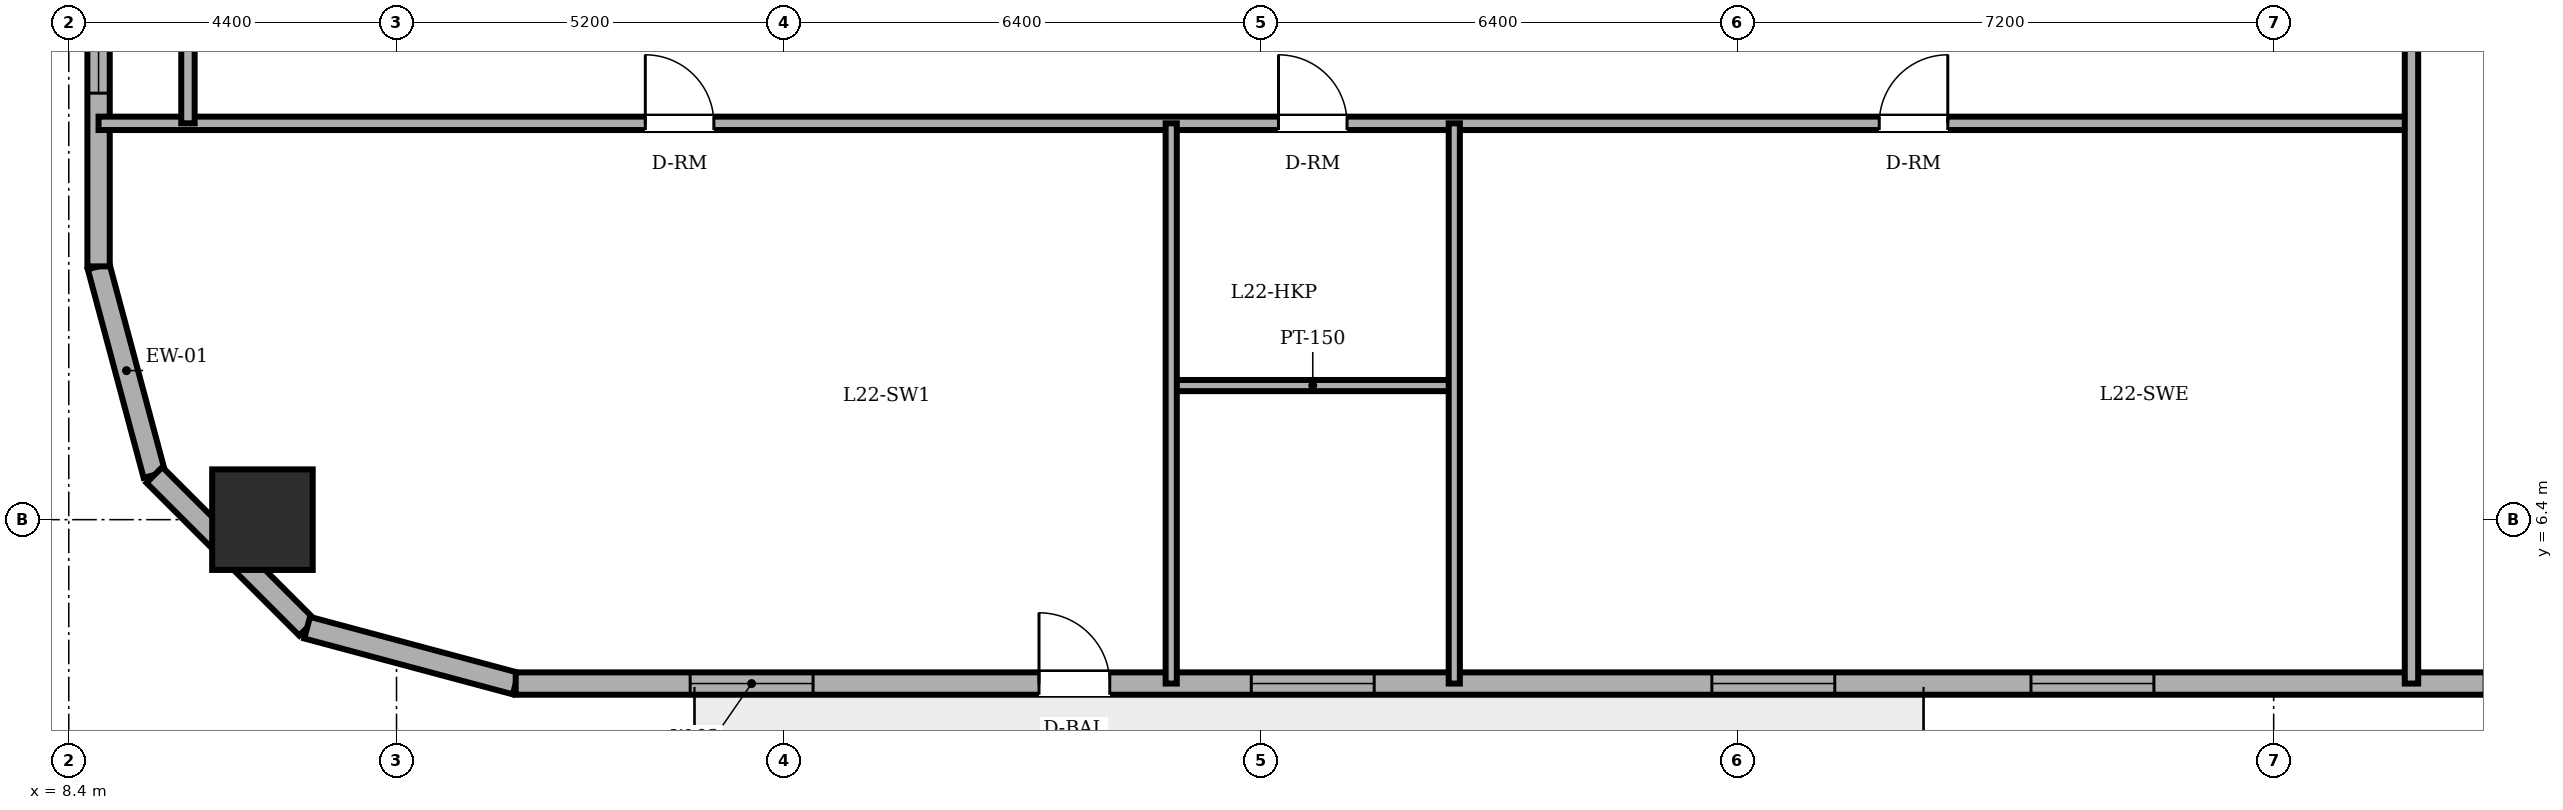
"""IFC4 building model, lengths in metres.
Left out: names, types, materials, properties, quantities, classifications, styles, units other than length and angle.
Written with IfcOpenShell. Run it as: python <this file> out.ifc"""

import sys

from ifc_helpers import new_model, si_unit, direction, frame, frame_2d, origin, origin_2d, place, context, subcontext, project, spatial, rectangle, circle, extrude, element, fill, save


model = new_model("IFC4")
c1 = context("Model", 3, precision=1e-05, world=origin(), true_north=direction((0.0, 1.0)))
c2 = subcontext(c1, "Body", "Model", "MODEL_VIEW")
j1 = project(units=[si_unit("LENGTHUNIT", "METRE"), si_unit("PLANEANGLEUNIT", "RADIAN")], contexts=[c1])
p1 = place(None, origin())
s1 = spatial("IfcSite", under=j1, at=p1, CompositionType="ELEMENT")
p2 = place(p1, origin())
s2 = spatial("IfcBuilding", under=s1, at=p2, CompositionType="ELEMENT")
p3 = place(p2, frame((0.0, 0.0, 86.3)))
s3 = spatial("IfcBuildingStorey", under=s2, at=p3, CompositionType="ELEMENT", Elevation=86.3)
p4 = place(p3, frame((11.0, 6.4, 0.0), z_axis=(0.0, 0.0, 1.0), x_axis=(1.0, 0.0, 0.0)))
e1 = element("IfcColumn", 1, at=p4, inside=s3, PredefinedType="COLUMN", context=c2, shape_type="SweptSolid", body=[
    extrude(circle(Radius=0.675, at=origin_2d()), origin(), (0.0, 0.0, 1.0), 3.6),
])
p5 = place(p3, frame((8.8, 9.8, 0.0), z_axis=(0.0, 0.0, 1.0), x_axis=(0.258731875344, -0.96594917914, 0.0)))
e2 = element("IfcWall", 2, at=p5, inside=s3, PredefinedType="SOLIDWALL", context=c2, shape_type="SweptSolid", body=[
    extrude(rectangle(XDim=2.899, YDim=0.3, at=frame_2d((1.449, 0.0))), origin(), (0.0, 0.0, 1.0), 3.4),
])
p6 = place(p3, frame((9.55, 7.0, 0.0), z_axis=(0.0, 0.0, 1.0), x_axis=(0.707106781187, -0.707106781187, 0.0)))
e3 = element("IfcWall", 3, at=p6, inside=s3, PredefinedType="SOLIDWALL", context=c2, shape_type="SweptSolid", body=[
    extrude(rectangle(XDim=2.899, YDim=0.3, at=frame_2d((1.45, 0.0))), origin(), (0.0, 0.0, 1.0), 3.4),
])
p7 = place(p3, frame((11.6, 4.95, 0.0), z_axis=(0.0, 0.0, 1.0), x_axis=(0.965943540406, -0.258752926066, 0.0)))
e4 = element("IfcWall", 4, at=p7, inside=s3, PredefinedType="SOLIDWALL", context=c2, shape_type="SweptSolid", body=[
    extrude(rectangle(XDim=2.898, YDim=0.3, at=frame_2d((1.449, 0.0))), origin(), (0.0, 0.0, 1.0), 3.4),
])
p8 = place(p3, frame((14.4, 4.2, 0.0), z_axis=(0.0, 0.0, 1.0), x_axis=(1.0, 0.0, 0.0)))
e5 = element("IfcWall", 5, at=p8, inside=s3, PredefinedType="SOLIDWALL", context=c2, shape_type="SweptSolid", body=[
    extrude(rectangle(XDim=29.933, YDim=0.3, at=frame_2d((14.967, 0.0))), origin(), (0.0, 0.0, 1.0), 3.4),
])
p9 = place(p8, frame((7.025, 0.0, 0.0)))
e6 = element("IfcOpeningElement", 6, at=p9, cuts=e5, PredefinedType="OPENING", context=c2, shape_type="SweptSolid", body=[
    extrude(rectangle(XDim=0.95, YDim=2.2, at=frame_2d((0.475, 1.1))), frame((0.0, 0.16, 0.0), z_axis=(0.0, -1.0, 0.0), x_axis=(1.0, 0.0, 0.0)), (0.0, 0.0, 1.0), 0.32),
])
p10 = place(p8, frame((2.342, 0.0, 0.85)))
e7 = element("IfcOpeningElement", 7, at=p10, cuts=e5, PredefinedType="OPENING", context=c2, shape_type="SweptSolid", body=[
    extrude(rectangle(XDim=1.65, YDim=1.55, at=frame_2d((0.825, 0.775))), frame((0.0, 0.16, 0.0), z_axis=(0.0, -1.0, 0.0), x_axis=(1.0, 0.0, 0.0)), (0.0, 0.0, 1.0), 0.32),
])
p11 = place(p8, frame((9.875, 0.0, 0.85)))
e8 = element("IfcOpeningElement", 8, at=p11, cuts=e5, PredefinedType="OPENING", context=c2, shape_type="SweptSolid", body=[
    extrude(rectangle(XDim=1.65, YDim=1.55, at=frame_2d((0.825, 0.775))), frame((0.0, 0.16, 0.0), z_axis=(0.0, -1.0, 0.0), x_axis=(1.0, 0.0, 0.0)), (0.0, 0.0, 1.0), 0.32),
])
p12 = place(p8, frame((16.058, 0.0, 0.85)))
e9 = element("IfcOpeningElement", 9, at=p12, cuts=e5, PredefinedType="OPENING", context=c2, shape_type="SweptSolid", body=[
    extrude(rectangle(XDim=1.65, YDim=1.55, at=frame_2d((0.825, 0.775))), frame((0.0, 0.16, 0.0), z_axis=(0.0, -1.0, 0.0), x_axis=(1.0, 0.0, 0.0)), (0.0, 0.0, 1.0), 0.32),
])
p13 = place(p8, frame((20.342, 0.0, 0.85)))
e10 = element("IfcOpeningElement", 10, at=p13, cuts=e5, PredefinedType="OPENING", context=c2, shape_type="SweptSolid", body=[
    extrude(rectangle(XDim=1.65, YDim=1.55, at=frame_2d((0.825, 0.775))), frame((0.0, 0.16, 0.0), z_axis=(0.0, -1.0, 0.0), x_axis=(1.0, 0.0, 0.0)), (0.0, 0.0, 1.0), 0.32),
])
p14 = place(p8, frame((26.425, 0.0, 0.85)))
e11 = element("IfcOpeningElement", 11, at=p14, cuts=e5, PredefinedType="OPENING", context=c2, shape_type="SweptSolid", body=[
    extrude(rectangle(XDim=1.65, YDim=1.55, at=frame_2d((0.825, 0.775))), frame((0.0, 0.16, 0.0), z_axis=(0.0, -1.0, 0.0), x_axis=(1.0, 0.0, 0.0)), (0.0, 0.0, 1.0), 0.32),
])
p15 = place(p3, frame((8.8, 38.2, 0.0), z_axis=(0.0, 0.0, 1.0), x_axis=(0.0, -1.0, 0.0)))
e12 = element("IfcWall", 12, at=p15, inside=s3, PredefinedType="SOLIDWALL", context=c2, shape_type="SweptSolid", body=[
    extrude(rectangle(XDim=28.4, YDim=0.3, at=frame_2d((14.2, 0.0))), origin(), (0.0, 0.0, 1.0), 3.4),
])
p16 = place(p15, frame((2.325, 0.0, 0.85)))
e13 = element("IfcOpeningElement", 13, at=p16, cuts=e12, PredefinedType="OPENING", context=c2, shape_type="SweptSolid", body=[
    extrude(rectangle(XDim=1.65, YDim=1.55, at=frame_2d((0.825, 0.775))), frame((0.0, 0.16, 0.0), z_axis=(0.0, -1.0, 0.0), x_axis=(1.0, 0.0, 0.0)), (0.0, 0.0, 1.0), 0.32),
])
p17 = place(p15, frame((7.328, 0.0, 0.85)))
e14 = element("IfcOpeningElement", 14, at=p17, cuts=e12, PredefinedType="OPENING", context=c2, shape_type="SweptSolid", body=[
    extrude(rectangle(XDim=1.65, YDim=1.55, at=frame_2d((0.825, 0.775))), frame((0.0, 0.16, 0.0), z_axis=(0.0, -1.0, 0.0), x_axis=(1.0, 0.0, 0.0)), (0.0, 0.0, 1.0), 0.32),
])
p18 = place(p15, frame((11.102, 0.0, 0.85)))
e15 = element("IfcOpeningElement", 15, at=p18, cuts=e12, PredefinedType="OPENING", context=c2, shape_type="SweptSolid", body=[
    extrude(rectangle(XDim=1.65, YDim=1.55, at=frame_2d((0.825, 0.775))), frame((0.0, 0.16, 0.0), z_axis=(0.0, -1.0, 0.0), x_axis=(1.0, 0.0, 0.0)), (0.0, 0.0, 1.0), 0.32),
])
p19 = place(p15, frame((17.648, 0.0, 0.85)))
e16 = element("IfcOpeningElement", 16, at=p19, cuts=e12, PredefinedType="OPENING", context=c2, shape_type="SweptSolid", body=[
    extrude(rectangle(XDim=1.65, YDim=1.55, at=frame_2d((0.825, 0.775))), frame((0.0, 0.16, 0.0), z_axis=(0.0, -1.0, 0.0), x_axis=(1.0, 0.0, 0.0)), (0.0, 0.0, 1.0), 0.32),
])
p20 = place(p15, frame((20.422, 0.0, 0.85)))
e17 = element("IfcOpeningElement", 17, at=p20, cuts=e12, PredefinedType="OPENING", context=c2, shape_type="SweptSolid", body=[
    extrude(rectangle(XDim=1.65, YDim=1.55, at=frame_2d((0.825, 0.775))), frame((0.0, 0.16, 0.0), z_axis=(0.0, -1.0, 0.0), x_axis=(1.0, 0.0, 0.0)), (0.0, 0.0, 1.0), 0.32),
])
p21 = place(p15, frame((24.425, 0.0, 0.85)))
e18 = element("IfcOpeningElement", 18, at=p21, cuts=e12, PredefinedType="OPENING", context=c2, shape_type="SweptSolid", body=[
    extrude(rectangle(XDim=1.65, YDim=1.55, at=frame_2d((0.825, 0.775))), frame((0.0, 0.16, 0.0), z_axis=(0.0, -1.0, 0.0), x_axis=(1.0, 0.0, 0.0)), (0.0, 0.0, 1.0), 0.32),
])
p22 = place(p3, frame((23.2, 8.2, 0.0), z_axis=(0.0, 0.0, 1.0), x_axis=(1.0, 0.0, 0.0)))
e19 = element("IfcWall", 19, at=p22, inside=s3, PredefinedType="PARTITIONING", context=c2, shape_type="SweptSolid", body=[
    extrude(rectangle(XDim=3.8, YDim=0.15, at=frame_2d((1.9, 0.0))), origin(), (0.0, 0.0, 1.0), 3.4),
])
p23 = place(p3, frame((8.8, 11.72, 0.0), z_axis=(0.0, 0.0, 1.0), x_axis=(1.0, 0.0, 0.0)))
e20 = element("IfcWall", 20, at=p23, inside=s3, PredefinedType="PARTITIONING", context=c2, shape_type="SweptSolid", body=[
    extrude(rectangle(XDim=31.05, YDim=0.18, at=frame_2d((15.525, 0.0))), origin(), (0.0, 0.0, 1.0), 3.4),
])
p24 = place(p23, frame((15.84, 0.0, 0.0)))
e21 = element("IfcOpeningElement", 21, at=p24, cuts=e20, PredefinedType="OPENING", context=c2, shape_type="SweptSolid", body=[
    extrude(rectangle(XDim=0.92, YDim=2.1, at=frame_2d((0.46, 1.05))), frame((0.0, 0.1, 0.0), z_axis=(0.0, -1.0, 0.0), x_axis=(1.0, 0.0, 0.0)), (0.0, 0.0, 1.0), 0.2),
])
p25 = place(p23, frame((7.34, 0.0, 0.0)))
e22 = element("IfcOpeningElement", 22, at=p25, cuts=e20, PredefinedType="OPENING", context=c2, shape_type="SweptSolid", body=[
    extrude(rectangle(XDim=0.92, YDim=2.1, at=frame_2d((0.46, 1.05))), frame((0.0, 0.1, 0.0), z_axis=(0.0, -1.0, 0.0), x_axis=(1.0, 0.0, 0.0)), (0.0, 0.0, 1.0), 0.2),
])
p26 = place(p23, frame((23.905, 0.0, 0.0)))
e23 = element("IfcOpeningElement", 23, at=p26, cuts=e20, PredefinedType="OPENING", context=c2, shape_type="SweptSolid", body=[
    extrude(rectangle(XDim=0.92, YDim=2.1, at=frame_2d((0.46, 1.05))), frame((0.0, 0.1, 0.0), z_axis=(0.0, -1.0, 0.0), x_axis=(1.0, 0.0, 0.0)), (0.0, 0.0, 1.0), 0.2),
])
p27 = place(p3, frame((10.0, 11.72, 0.0), z_axis=(0.0, 0.0, 1.0), x_axis=(0.0, 1.0, 0.0)))
e24 = element("IfcWall", 24, at=p27, inside=s3, PredefinedType="PARTITIONING", context=c2, shape_type="SweptSolid", body=[
    extrude(rectangle(XDim=2.46, YDim=0.18, at=frame_2d((1.23, 0.0))), origin(), (0.0, 0.0, 1.0), 3.4),
])
for number, where, z_axis, x_axis in (
    (25, (23.2, 4.2, 0.0), (0.0, 0.0, 1.0), (0.0, 1.0, 0.0)),
    (26, (27.0, 4.2, 0.0), (0.0, 0.0, 1.0), (0.0, 1.0, 0.0)),
):
    element("IfcWall", number, at=place(p3, frame(where, z_axis=z_axis, x_axis=x_axis)), inside=s3, PredefinedType="PARTITIONING", context=c2, shape_type="SweptSolid", body=[
        extrude(rectangle(XDim=7.52, YDim=0.15, at=frame_2d((3.76, 0.0))), origin(), (0.0, 0.0, 1.0), 3.4),
    ])
p28 = place(p3, frame((39.85, 4.2, 0.0), z_axis=(0.0, 0.0, 1.0), x_axis=(0.0, 1.0, 0.0)))
e27 = element("IfcWall", 27, at=p28, inside=s3, PredefinedType="PARTITIONING", context=c2, shape_type="SweptSolid", body=[
    extrude(rectangle(XDim=18.62, YDim=0.18, at=frame_2d((9.31, 0.0))), origin(), (0.0, 0.0, 1.0), 3.4),
])
p29 = place(p28, frame((12.35, 0.0, 0.0)))
e28 = element("IfcOpeningElement", 28, at=p29, cuts=e27, PredefinedType="OPENING", context=c2, shape_type="SweptSolid", body=[
    extrude(rectangle(XDim=0.92, YDim=2.1, at=frame_2d((0.46, 1.05))), frame((0.0, 0.1, 0.0), z_axis=(0.0, -1.0, 0.0), x_axis=(1.0, 0.0, 0.0)), (0.0, 0.0, 1.0), 0.2),
])
p30 = place(p9, origin())
e29 = element("IfcDoor", 29, at=p30, inside=s3, OperationType="SINGLE_SWING_LEFT", PredefinedType="DOOR", context=c2, shape_type="SweptSolid", body=[
    extrude(rectangle(XDim=0.95, YDim=2.2, at=frame_2d((0.475, 1.1))), frame((0.0, 0.025, 0.0), z_axis=(0.0, -1.0, 0.0), x_axis=(1.0, 0.0, 0.0)), (0.0, 0.0, 1.0), 0.05),
])
fill(e6, e29)
p31 = place(p10, origin())
e30 = element("IfcWindow", 30, at=p31, inside=s3, PartitioningType="DOUBLE_PANEL_VERTICAL", PredefinedType="WINDOW", context=c2, shape_type="SweptSolid", body=[
    extrude(rectangle(XDim=1.65, YDim=1.55, at=frame_2d((0.825, 0.775))), frame((0.0, 0.03, 0.0), z_axis=(0.0, -1.0, 0.0), x_axis=(1.0, 0.0, 0.0)), (0.0, 0.0, 1.0), 0.06),
])
fill(e7, e30)
p32 = place(p11, origin())
e31 = element("IfcWindow", 31, at=p32, inside=s3, PartitioningType="DOUBLE_PANEL_VERTICAL", PredefinedType="WINDOW", context=c2, shape_type="SweptSolid", body=[
    extrude(rectangle(XDim=1.65, YDim=1.55, at=frame_2d((0.825, 0.775))), frame((0.0, 0.03, 0.0), z_axis=(0.0, -1.0, 0.0), x_axis=(1.0, 0.0, 0.0)), (0.0, 0.0, 1.0), 0.06),
])
fill(e8, e31)
p33 = place(p12, origin())
e32 = element("IfcWindow", 32, at=p33, inside=s3, PartitioningType="DOUBLE_PANEL_VERTICAL", PredefinedType="WINDOW", context=c2, shape_type="SweptSolid", body=[
    extrude(rectangle(XDim=1.65, YDim=1.55, at=frame_2d((0.825, 0.775))), frame((0.0, 0.03, 0.0), z_axis=(0.0, -1.0, 0.0), x_axis=(1.0, 0.0, 0.0)), (0.0, 0.0, 1.0), 0.06),
])
fill(e9, e32)
p34 = place(p13, origin())
e33 = element("IfcWindow", 33, at=p34, inside=s3, PartitioningType="DOUBLE_PANEL_VERTICAL", PredefinedType="WINDOW", context=c2, shape_type="SweptSolid", body=[
    extrude(rectangle(XDim=1.65, YDim=1.55, at=frame_2d((0.825, 0.775))), frame((0.0, 0.03, 0.0), z_axis=(0.0, -1.0, 0.0), x_axis=(1.0, 0.0, 0.0)), (0.0, 0.0, 1.0), 0.06),
])
fill(e10, e33)
p35 = place(p21, origin())
e34 = element("IfcWindow", 34, at=p35, inside=s3, PartitioningType="DOUBLE_PANEL_VERTICAL", PredefinedType="WINDOW", context=c2, shape_type="SweptSolid", body=[
    extrude(rectangle(XDim=1.65, YDim=1.55, at=frame_2d((0.825, 0.775))), frame((0.0, 0.03, 0.0), z_axis=(0.0, -1.0, 0.0), x_axis=(1.0, 0.0, 0.0)), (0.0, 0.0, 1.0), 0.06),
])
fill(e18, e34)
p36 = place(p24, origin())
e35 = element("IfcDoor", 35, at=p36, inside=s3, OperationType="SINGLE_SWING_LEFT", PredefinedType="DOOR", context=c2, shape_type="SweptSolid", body=[
    extrude(rectangle(XDim=0.92, YDim=2.1, at=frame_2d((0.46, 1.05))), frame((0.0, 0.025, 0.0), z_axis=(0.0, -1.0, 0.0), x_axis=(1.0, 0.0, 0.0)), (0.0, 0.0, 1.0), 0.05),
])
fill(e21, e35)
p37 = place(p25, origin())
e36 = element("IfcDoor", 36, at=p37, inside=s3, OperationType="SINGLE_SWING_LEFT", PredefinedType="DOOR", context=c2, shape_type="SweptSolid", body=[
    extrude(rectangle(XDim=0.92, YDim=2.1, at=frame_2d((0.46, 1.05))), frame((0.0, 0.025, 0.0), z_axis=(0.0, -1.0, 0.0), x_axis=(1.0, 0.0, 0.0)), (0.0, 0.0, 1.0), 0.05),
])
fill(e22, e36)
p38 = place(p26, origin())
e37 = element("IfcDoor", 37, at=p38, inside=s3, OperationType="SINGLE_SWING_RIGHT", PredefinedType="DOOR", context=c2, shape_type="SweptSolid", body=[
    extrude(rectangle(XDim=0.92, YDim=2.1, at=frame_2d((0.46, 1.05))), frame((0.0, 0.025, 0.0), z_axis=(0.0, -1.0, 0.0), x_axis=(1.0, 0.0, 0.0)), (0.0, 0.0, 1.0), 0.05),
])
fill(e23, e37)
save(model, sys.argv[1])
